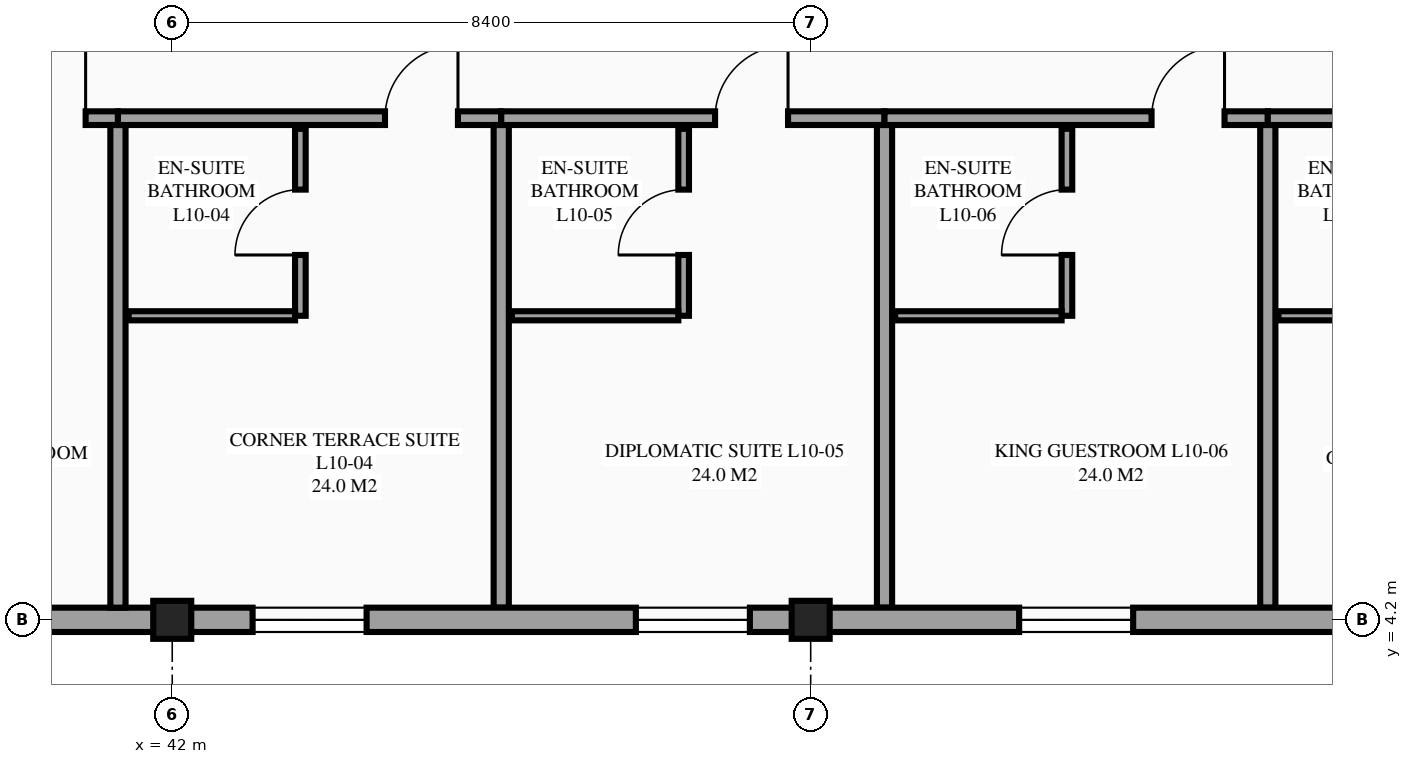
"""IFC4 building model, lengths in metres.
Left out: names, types, materials, properties, quantities, classifications, styles, units other than length and angle.
Written with IfcOpenShell. Run it as: python <this file> out.ifc"""

import sys

from ifc_helpers import new_model, si_unit, direction, frame, frame_2d, origin, origin_2d, place, context, subcontext, project, spatial, rectangle, extrude, element, fill, save


model = new_model("IFC4")
c1 = context("Model", 3, precision=1e-05, world=origin(), true_north=direction((0.0, 1.0)))
c2 = subcontext(c1, "Body", "Model", "MODEL_VIEW")
j1 = project(units=[si_unit("LENGTHUNIT", "METRE"), si_unit("PLANEANGLEUNIT", "RADIAN")], contexts=[c1])
p1 = place(None, origin())
s1 = spatial("IfcSite", under=j1, at=p1, CompositionType="ELEMENT")
p2 = place(p1, origin())
s2 = spatial("IfcBuilding", under=s1, at=p2, CompositionType="ELEMENT")
p3 = place(p2, frame((0.0, 0.0, 39.9)))
s3 = spatial("IfcBuildingStorey", under=s2, at=p3, CompositionType="ELEMENT", Elevation=39.9)
for number, where, z_axis, x_axis in (
    (1, (42.0, 4.2, 0.0), (0.0, 0.0, 1.0), (1.0, 0.0, 0.0)),
    (2, (50.4, 4.2, 0.0), (0.0, 0.0, 1.0), (1.0, 0.0, 0.0)),
):
    element("IfcColumn", number, at=place(p3, frame(where, z_axis=z_axis, x_axis=x_axis)), inside=s3, PredefinedType="COLUMN", context=c2, shape_type="SweptSolid", body=[
        extrude(rectangle(XDim=0.5, YDim=0.5, at=origin_2d()), origin(), (0.0, 0.0, 1.0), 3.6),
    ])
p4 = place(p3, frame((25.2, 4.2, 0.0), z_axis=(0.0, 0.0, 1.0), x_axis=(1.0, 0.0, 0.0)))
e3 = element("IfcWall", 3, at=p4, inside=s3, PredefinedType="STANDARD", context=c2, shape_type="SweptSolid", body=[
    extrude(rectangle(XDim=16.8, YDim=0.32, at=frame_2d((8.4, 0.0))), origin(), (0.0, 0.0, 1.0), 2.63),
])
p5 = place(p4, frame((9.021, 0.0, 0.85)))
e4 = element("IfcOpeningElement", 4, at=p5, cuts=e3, PredefinedType="OPENING", context=c2, shape_type="SweptSolid", body=[
    extrude(rectangle(XDim=1.5, YDim=1.5, at=frame_2d((0.75, 0.75))), frame((0.0, 0.17, 0.0), z_axis=(0.0, -1.0, 0.0), x_axis=(1.0, 0.0, 0.0)), (0.0, 0.0, 1.0), 0.34),
])
p6 = place(p4, frame((12.814, 0.0, 0.85)))
e5 = element("IfcOpeningElement", 5, at=p6, cuts=e3, PredefinedType="OPENING", context=c2, shape_type="SweptSolid", body=[
    extrude(rectangle(XDim=1.5, YDim=1.5, at=frame_2d((0.75, 0.75))), frame((0.0, 0.17, 0.0), z_axis=(0.0, -1.0, 0.0), x_axis=(1.0, 0.0, 0.0)), (0.0, 0.0, 1.0), 0.34),
])
p7 = place(p4, frame((2.25, 0.0, 0.75)))
e6 = element("IfcOpeningElement", 6, at=p7, cuts=e3, PredefinedType="OPENING", context=c2, shape_type="SweptSolid", body=[
    extrude(rectangle(XDim=2.1, YDim=1.5, at=frame_2d((1.05, 0.75))), frame((0.0, 0.17, 0.0), z_axis=(0.0, -1.0, 0.0), x_axis=(1.0, 0.0, 0.0)), (0.0, 0.0, 1.0), 0.34),
])
p8 = place(p3, frame((36.243, 10.8, 0.0), z_axis=(0.0, 0.0, 1.0), x_axis=(1.0, 0.0, 0.0)))
e7 = element("IfcWall", 7, at=p8, inside=s3, PredefinedType="PARTITIONING", context=c2, shape_type="SweptSolid", body=[
    extrude(rectangle(XDim=5.043, YDim=0.18, at=frame_2d((2.521, 0.0))), origin(), (0.0, 0.0, 1.0), 3.375),
])
p9 = place(p8, frame((3.597, 0.0, 0.0)))
e8 = element("IfcOpeningElement", 8, at=p9, cuts=e7, PredefinedType="OPENING", context=c2, shape_type="SweptSolid", body=[
    extrude(rectangle(XDim=1.02, YDim=2.15, at=frame_2d((0.51, 1.075))), frame((0.0, 0.1, 0.0), z_axis=(0.0, -1.0, 0.0), x_axis=(1.0, 0.0, 0.0)), (0.0, 0.0, 1.0), 0.2),
])
p10 = place(p3, frame((41.286, 4.36, 0.0), z_axis=(0.0, 0.0, 1.0), x_axis=(0.0, 1.0, 0.0)))
e9 = element("IfcWall", 9, at=p10, inside=s3, PredefinedType="PARTITIONING", context=c2, shape_type="SweptSolid", body=[
    extrude(rectangle(XDim=6.35, YDim=0.2, at=frame_2d((3.175, 0.0))), origin(), (0.0, 0.0, 1.0), 3.375),
])
p11 = place(p3, frame((41.286, 10.8, 0.0), z_axis=(0.0, 0.0, 1.0), x_axis=(1.0, 0.0, 0.0)))
e10 = element("IfcWall", 10, at=p11, inside=s3, PredefinedType="PARTITIONING", context=c2, shape_type="SweptSolid", body=[
    extrude(rectangle(XDim=5.043, YDim=0.18, at=frame_2d((2.521, 0.0))), origin(), (0.0, 0.0, 1.0), 3.375),
])
p12 = place(p11, frame((3.514, 0.0, 0.0)))
e11 = element("IfcOpeningElement", 11, at=p12, cuts=e10, PredefinedType="OPENING", context=c2, shape_type="SweptSolid", body=[
    extrude(rectangle(XDim=0.96, YDim=2.15, at=frame_2d((0.48, 1.075))), frame((0.0, 0.1, 0.0), z_axis=(0.0, -1.0, 0.0), x_axis=(1.0, 0.0, 0.0)), (0.0, 0.0, 1.0), 0.2),
])
p13 = place(p3, frame((46.329, 4.36, 0.0), z_axis=(0.0, 0.0, 1.0), x_axis=(0.0, 1.0, 0.0)))
e12 = element("IfcWall", 12, at=p13, inside=s3, PredefinedType="PARTITIONING", context=c2, shape_type="SweptSolid", body=[
    extrude(rectangle(XDim=6.35, YDim=0.2, at=frame_2d((3.175, 0.0))), origin(), (0.0, 0.0, 1.0), 3.375),
])
p14 = place(p3, frame((43.686, 8.2, 0.0), z_axis=(0.0, 0.0, 1.0), x_axis=(0.0, 1.0, 0.0)))
e13 = element("IfcWall", 13, at=p14, inside=s3, PredefinedType="PARTITIONING", context=c2, shape_type="SweptSolid", body=[
    extrude(rectangle(XDim=2.46, YDim=0.14, at=frame_2d((1.23, 0.0))), origin(), (0.0, 0.0, 1.0), 3.375),
])
p15 = place(p14, frame((0.8, 0.0, 0.0)))
e14 = element("IfcOpeningElement", 14, at=p15, cuts=e13, PredefinedType="OPENING", context=c2, shape_type="SweptSolid", body=[
    extrude(rectangle(XDim=0.86, YDim=2.1, at=frame_2d((0.43, 1.05))), frame((0.0, 0.08, 0.0), z_axis=(0.0, -1.0, 0.0), x_axis=(1.0, 0.0, 0.0)), (0.0, 0.0, 1.0), 0.16),
])
p16 = place(p3, frame((41.426, 8.2, 0.0), z_axis=(0.0, 0.0, 1.0), x_axis=(1.0, 0.0, 0.0)))
e15 = element("IfcWall", 15, at=p16, inside=s3, PredefinedType="PARTITIONING", context=c2, shape_type="SweptSolid", body=[
    extrude(rectangle(XDim=2.19, YDim=0.12, at=frame_2d((1.095, 0.0))), origin(), (0.0, 0.0, 1.0), 3.375),
])
p17 = place(p3, frame((46.329, 10.8, 0.0), z_axis=(0.0, 0.0, 1.0), x_axis=(1.0, 0.0, 0.0)))
e16 = element("IfcWall", 16, at=p17, inside=s3, PredefinedType="PARTITIONING", context=c2, shape_type="SweptSolid", body=[
    extrude(rectangle(XDim=5.043, YDim=0.18, at=frame_2d((2.521, 0.0))), origin(), (0.0, 0.0, 1.0), 3.375),
])
p18 = place(p17, frame((2.813, 0.0, 0.0)))
e17 = element("IfcOpeningElement", 17, at=p18, cuts=e16, PredefinedType="OPENING", context=c2, shape_type="SweptSolid", body=[
    extrude(rectangle(XDim=0.96, YDim=2.15, at=frame_2d((0.48, 1.075))), frame((0.0, 0.1, 0.0), z_axis=(0.0, -1.0, 0.0), x_axis=(1.0, 0.0, 0.0)), (0.0, 0.0, 1.0), 0.2),
])
p19 = place(p3, frame((51.371, 4.36, 0.0), z_axis=(0.0, 0.0, 1.0), x_axis=(0.0, 1.0, 0.0)))
e18 = element("IfcWall", 18, at=p19, inside=s3, PredefinedType="PARTITIONING", context=c2, shape_type="SweptSolid", body=[
    extrude(rectangle(XDim=6.35, YDim=0.2, at=frame_2d((3.175, 0.0))), origin(), (0.0, 0.0, 1.0), 3.375),
])
p20 = place(p3, frame((48.729, 8.2, 0.0), z_axis=(0.0, 0.0, 1.0), x_axis=(0.0, 1.0, 0.0)))
e19 = element("IfcWall", 19, at=p20, inside=s3, PredefinedType="PARTITIONING", context=c2, shape_type="SweptSolid", body=[
    extrude(rectangle(XDim=2.46, YDim=0.14, at=frame_2d((1.23, 0.0))), origin(), (0.0, 0.0, 1.0), 3.375),
])
p21 = place(p20, frame((0.8, 0.0, 0.0)))
e20 = element("IfcOpeningElement", 20, at=p21, cuts=e19, PredefinedType="OPENING", context=c2, shape_type="SweptSolid", body=[
    extrude(rectangle(XDim=0.86, YDim=2.1, at=frame_2d((0.43, 1.05))), frame((0.0, 0.08, 0.0), z_axis=(0.0, -1.0, 0.0), x_axis=(1.0, 0.0, 0.0)), (0.0, 0.0, 1.0), 0.16),
])
p22 = place(p3, frame((46.469, 8.2, 0.0), z_axis=(0.0, 0.0, 1.0), x_axis=(1.0, 0.0, 0.0)))
e21 = element("IfcWall", 21, at=p22, inside=s3, PredefinedType="PARTITIONING", context=c2, shape_type="SweptSolid", body=[
    extrude(rectangle(XDim=2.19, YDim=0.12, at=frame_2d((1.095, 0.0))), origin(), (0.0, 0.0, 1.0), 3.375),
])
p23 = place(p3, frame((51.371, 10.8, 0.0), z_axis=(0.0, 0.0, 1.0), x_axis=(1.0, 0.0, 0.0)))
e22 = element("IfcWall", 22, at=p23, inside=s3, PredefinedType="PARTITIONING", context=c2, shape_type="SweptSolid", body=[
    extrude(rectangle(XDim=5.043, YDim=0.18, at=frame_2d((2.521, 0.0))), origin(), (0.0, 0.0, 1.0), 3.375),
])
p24 = place(p23, frame((3.514, 0.0, 0.0)))
e23 = element("IfcOpeningElement", 23, at=p24, cuts=e22, PredefinedType="OPENING", context=c2, shape_type="SweptSolid", body=[
    extrude(rectangle(XDim=0.96, YDim=2.15, at=frame_2d((0.48, 1.075))), frame((0.0, 0.1, 0.0), z_axis=(0.0, -1.0, 0.0), x_axis=(1.0, 0.0, 0.0)), (0.0, 0.0, 1.0), 0.2),
])
p25 = place(p3, frame((56.414, 4.36, 0.0), z_axis=(0.0, 0.0, 1.0), x_axis=(0.0, 1.0, 0.0)))
e24 = element("IfcWall", 24, at=p25, inside=s3, PredefinedType="PARTITIONING", context=c2, shape_type="SweptSolid", body=[
    extrude(rectangle(XDim=6.35, YDim=0.2, at=frame_2d((3.175, 0.0))), origin(), (0.0, 0.0, 1.0), 3.375),
])
p26 = place(p3, frame((53.771, 8.2, 0.0), z_axis=(0.0, 0.0, 1.0), x_axis=(0.0, 1.0, 0.0)))
e25 = element("IfcWall", 25, at=p26, inside=s3, PredefinedType="PARTITIONING", context=c2, shape_type="SweptSolid", body=[
    extrude(rectangle(XDim=2.46, YDim=0.14, at=frame_2d((1.23, 0.0))), origin(), (0.0, 0.0, 1.0), 3.375),
])
p27 = place(p26, frame((0.8, 0.0, 0.0)))
e26 = element("IfcOpeningElement", 26, at=p27, cuts=e25, PredefinedType="OPENING", context=c2, shape_type="SweptSolid", body=[
    extrude(rectangle(XDim=0.86, YDim=2.1, at=frame_2d((0.43, 1.05))), frame((0.0, 0.08, 0.0), z_axis=(0.0, -1.0, 0.0), x_axis=(1.0, 0.0, 0.0)), (0.0, 0.0, 1.0), 0.16),
])
p28 = place(p3, frame((51.511, 8.2, 0.0), z_axis=(0.0, 0.0, 1.0), x_axis=(1.0, 0.0, 0.0)))
e27 = element("IfcWall", 27, at=p28, inside=s3, PredefinedType="PARTITIONING", context=c2, shape_type="SweptSolid", body=[
    extrude(rectangle(XDim=2.19, YDim=0.12, at=frame_2d((1.095, 0.0))), origin(), (0.0, 0.0, 1.0), 3.375),
])
p29 = place(p3, frame((56.414, 10.8, 0.0), z_axis=(0.0, 0.0, 1.0), x_axis=(1.0, 0.0, 0.0)))
e28 = element("IfcWall", 28, at=p29, inside=s3, PredefinedType="PARTITIONING", context=c2, shape_type="SweptSolid", body=[
    extrude(rectangle(XDim=5.043, YDim=0.18, at=frame_2d((2.521, 0.0))), origin(), (0.0, 0.0, 1.0), 3.375),
])
p30 = place(p29, frame((3.513, 0.0, 0.0)))
e29 = element("IfcOpeningElement", 29, at=p30, cuts=e28, PredefinedType="OPENING", context=c2, shape_type="SweptSolid", body=[
    extrude(rectangle(XDim=0.96, YDim=2.15, at=frame_2d((0.48, 1.075))), frame((0.0, 0.1, 0.0), z_axis=(0.0, -1.0, 0.0), x_axis=(1.0, 0.0, 0.0)), (0.0, 0.0, 1.0), 0.2),
])
p31 = place(p3, frame((56.554, 8.2, 0.0), z_axis=(0.0, 0.0, 1.0), x_axis=(1.0, 0.0, 0.0)))
e30 = element("IfcWall", 30, at=p31, inside=s3, PredefinedType="PARTITIONING", context=c2, shape_type="SweptSolid", body=[
    extrude(rectangle(XDim=2.19, YDim=0.12, at=frame_2d((1.095, 0.0))), origin(), (0.0, 0.0, 1.0), 3.375),
])
p32 = place(p3, frame((42.0, 4.2, 0.0), z_axis=(0.0, 0.0, 1.0), x_axis=(1.0, 0.0, 0.0)))
e31 = element("IfcWall", 31, at=p32, inside=s3, PredefinedType="STANDARD", context=c2, shape_type="SweptSolid", body=[
    extrude(rectangle(XDim=8.4, YDim=0.32, at=frame_2d((4.2, 0.0))), origin(), (0.0, 0.0, 1.0), 3.075),
])
p33 = place(p32, frame((1.057, 0.0, 0.85)))
e32 = element("IfcOpeningElement", 32, at=p33, cuts=e31, PredefinedType="OPENING", context=c2, shape_type="SweptSolid", body=[
    extrude(rectangle(XDim=1.5, YDim=1.5, at=frame_2d((0.75, 0.75))), frame((0.0, 0.17, 0.0), z_axis=(0.0, -1.0, 0.0), x_axis=(1.0, 0.0, 0.0)), (0.0, 0.0, 1.0), 0.34),
])
p34 = place(p32, frame((6.1, 0.0, 0.85)))
e33 = element("IfcOpeningElement", 33, at=p34, cuts=e31, PredefinedType="OPENING", context=c2, shape_type="SweptSolid", body=[
    extrude(rectangle(XDim=1.5, YDim=1.5, at=frame_2d((0.75, 0.75))), frame((0.0, 0.17, 0.0), z_axis=(0.0, -1.0, 0.0), x_axis=(1.0, 0.0, 0.0)), (0.0, 0.0, 1.0), 0.34),
])
p35 = place(p3, frame((50.4, 4.2, 0.0), z_axis=(0.0, 0.0, 1.0), x_axis=(1.0, 0.0, 0.0)))
e34 = element("IfcWall", 34, at=p35, inside=s3, PredefinedType="STANDARD", context=c2, shape_type="SweptSolid", body=[
    extrude(rectangle(XDim=8.4, YDim=0.32, at=frame_2d((4.2, 0.0))), origin(), (0.0, 0.0, 1.0), 2.78),
])
p36 = place(p35, frame((2.743, 0.0, 0.85)))
e35 = element("IfcOpeningElement", 35, at=p36, cuts=e34, PredefinedType="OPENING", context=c2, shape_type="SweptSolid", body=[
    extrude(rectangle(XDim=1.5, YDim=1.5, at=frame_2d((0.75, 0.75))), frame((0.0, 0.17, 0.0), z_axis=(0.0, -1.0, 0.0), x_axis=(1.0, 0.0, 0.0)), (0.0, 0.0, 1.0), 0.34),
])
p37 = place(p33, origin())
e36 = element("IfcWindow", 36, at=p37, inside=s3, PartitioningType="SINGLE_PANEL", PredefinedType="WINDOW", context=c2, shape_type="SweptSolid", body=[
    extrude(rectangle(XDim=1.5, YDim=1.5, at=frame_2d((0.75, 0.75))), frame((0.0, 0.03, 0.0), z_axis=(0.0, -1.0, 0.0), x_axis=(1.0, 0.0, 0.0)), (0.0, 0.0, 1.0), 0.06),
])
fill(e32, e36)
p38 = place(p34, origin())
e37 = element("IfcWindow", 37, at=p38, inside=s3, PartitioningType="SINGLE_PANEL", PredefinedType="WINDOW", context=c2, shape_type="SweptSolid", body=[
    extrude(rectangle(XDim=1.5, YDim=1.5, at=frame_2d((0.75, 0.75))), frame((0.0, 0.03, 0.0), z_axis=(0.0, -1.0, 0.0), x_axis=(1.0, 0.0, 0.0)), (0.0, 0.0, 1.0), 0.06),
])
fill(e33, e37)
p39 = place(p36, origin())
e38 = element("IfcWindow", 38, at=p39, inside=s3, PartitioningType="SINGLE_PANEL", PredefinedType="WINDOW", context=c2, shape_type="SweptSolid", body=[
    extrude(rectangle(XDim=1.5, YDim=1.5, at=frame_2d((0.75, 0.75))), frame((0.0, 0.03, 0.0), z_axis=(0.0, -1.0, 0.0), x_axis=(1.0, 0.0, 0.0)), (0.0, 0.0, 1.0), 0.06),
])
fill(e35, e38)
p40 = place(p9, origin())
e39 = element("IfcDoor", 39, at=p40, inside=s3, OperationType="SINGLE_SWING_RIGHT", PredefinedType="DOOR", context=c2, shape_type="SweptSolid", body=[
    extrude(rectangle(XDim=1.02, YDim=2.15, at=frame_2d((0.51, 1.075))), frame((0.0, 0.025, 0.0), z_axis=(0.0, -1.0, 0.0), x_axis=(1.0, 0.0, 0.0)), (0.0, 0.0, 1.0), 0.05),
])
fill(e8, e39)
p41 = place(p12, origin())
e40 = element("IfcDoor", 40, at=p41, inside=s3, OperationType="SINGLE_SWING_RIGHT", PredefinedType="DOOR", context=c2, shape_type="SweptSolid", body=[
    extrude(rectangle(XDim=0.96, YDim=2.15, at=frame_2d((0.48, 1.075))), frame((0.0, 0.025, 0.0), z_axis=(0.0, -1.0, 0.0), x_axis=(1.0, 0.0, 0.0)), (0.0, 0.0, 1.0), 0.05),
])
fill(e11, e40)
p42 = place(p15, origin())
e41 = element("IfcDoor", 41, at=p42, inside=s3, OperationType="SINGLE_SWING_LEFT", PredefinedType="DOOR", context=c2, shape_type="SweptSolid", body=[
    extrude(rectangle(XDim=0.86, YDim=2.1, at=frame_2d((0.43, 1.05))), frame((0.0, 0.025, 0.0), z_axis=(0.0, -1.0, 0.0), x_axis=(1.0, 0.0, 0.0)), (0.0, 0.0, 1.0), 0.05),
])
fill(e14, e41)
p43 = place(p18, origin())
e42 = element("IfcDoor", 42, at=p43, inside=s3, OperationType="SINGLE_SWING_RIGHT", PredefinedType="DOOR", context=c2, shape_type="SweptSolid", body=[
    extrude(rectangle(XDim=0.96, YDim=2.15, at=frame_2d((0.48, 1.075))), frame((0.0, 0.025, 0.0), z_axis=(0.0, -1.0, 0.0), x_axis=(1.0, 0.0, 0.0)), (0.0, 0.0, 1.0), 0.05),
])
fill(e17, e42)
p44 = place(p21, origin())
e43 = element("IfcDoor", 43, at=p44, inside=s3, OperationType="SINGLE_SWING_LEFT", PredefinedType="DOOR", context=c2, shape_type="SweptSolid", body=[
    extrude(rectangle(XDim=0.86, YDim=2.1, at=frame_2d((0.43, 1.05))), frame((0.0, 0.025, 0.0), z_axis=(0.0, -1.0, 0.0), x_axis=(1.0, 0.0, 0.0)), (0.0, 0.0, 1.0), 0.05),
])
fill(e20, e43)
p45 = place(p24, origin())
e44 = element("IfcDoor", 44, at=p45, inside=s3, OperationType="SINGLE_SWING_RIGHT", PredefinedType="DOOR", context=c2, shape_type="SweptSolid", body=[
    extrude(rectangle(XDim=0.96, YDim=2.15, at=frame_2d((0.48, 1.075))), frame((0.0, 0.025, 0.0), z_axis=(0.0, -1.0, 0.0), x_axis=(1.0, 0.0, 0.0)), (0.0, 0.0, 1.0), 0.05),
])
fill(e23, e44)
p46 = place(p27, origin())
e45 = element("IfcDoor", 45, at=p46, inside=s3, OperationType="SINGLE_SWING_LEFT", PredefinedType="DOOR", context=c2, shape_type="SweptSolid", body=[
    extrude(rectangle(XDim=0.86, YDim=2.1, at=frame_2d((0.43, 1.05))), frame((0.0, 0.025, 0.0), z_axis=(0.0, -1.0, 0.0), x_axis=(1.0, 0.0, 0.0)), (0.0, 0.0, 1.0), 0.05),
])
fill(e26, e45)
save(model, sys.argv[1])
